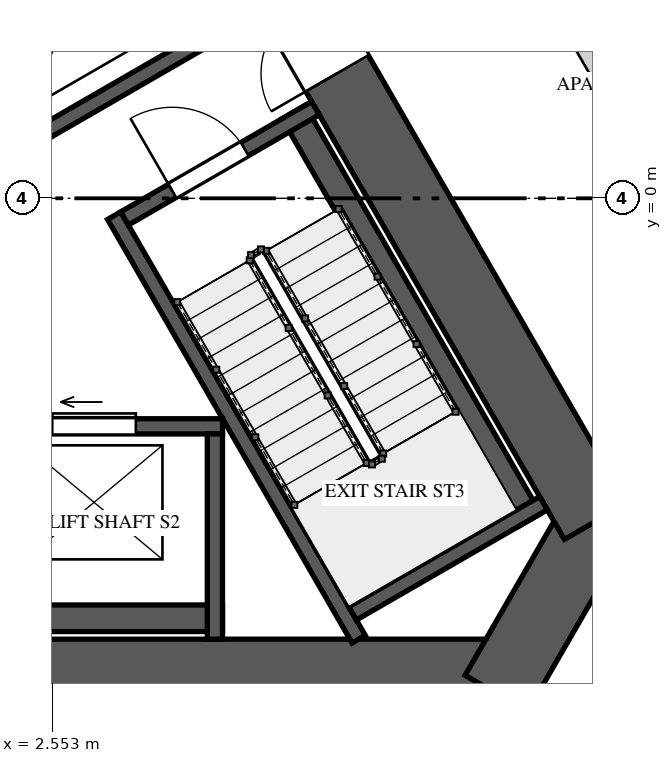
"""IFC4 building model, lengths in metres.
Left out: names, types, materials, properties, quantities, classifications, styles, units other than length and angle.
Written with IfcOpenShell. Run it as: python <this file> out.ifc"""

import sys

from ifc_helpers import new_model, si_unit, direction, frame, frame_2d, origin, place, context, subcontext, project, spatial, rectangle, extrude, element, fill, save


model = new_model("IFC4")
c1 = context("Model", 3, precision=1e-05, world=origin(), true_north=direction((0.0, 1.0)))
c2 = subcontext(c1, "Body", "Model", "MODEL_VIEW")
j1 = project(units=[si_unit("LENGTHUNIT", "METRE"), si_unit("PLANEANGLEUNIT", "RADIAN")], contexts=[c1])
p1 = place(None, origin())
s1 = spatial("IfcSite", under=j1, at=p1, CompositionType="ELEMENT")
p2 = place(p1, origin())
s2 = spatial("IfcBuilding", under=s1, at=p2, CompositionType="ELEMENT")
p3 = place(p2, frame((0.0, 0.0, 88.4)))
s3 = spatial("IfcBuildingStorey", under=s2, at=p3, CompositionType="ELEMENT", Elevation=88.4)
p4 = place(p3, frame((-8.531, -6.275, 0.0), z_axis=(0.0, 0.0, 1.0), x_axis=(1.0, 0.0, 0.0)))
e1 = element("IfcWall", 1, at=p4, inside=s3, PredefinedType="SHEAR", context=c2, shape_type="SweptSolid", body=[
    extrude(rectangle(XDim=17.061, YDim=0.95, at=frame_2d((8.531, 0.0))), origin(), (0.0, 0.0, 1.0), 4.0),
])
p5 = place(p4, frame((6.735, 0.0, 0.0)))
e2 = element("IfcOpeningElement", 2, at=p5, cuts=e1, PredefinedType="OPENING", context=c2, shape_type="SweptSolid", body=[
    extrude(rectangle(XDim=1.0, YDim=2.4, at=frame_2d((0.5, 1.2))), frame((0.0, 0.485, 0.0), z_axis=(0.0, -1.0, 0.0), x_axis=(1.0, 0.0, 0.0)), (0.0, 0.0, 1.0), 0.97),
])
p6 = place(p3, frame((8.393, -6.512, 0.0), z_axis=(0.0, 0.0, 1.0), x_axis=(0.499995765644, 0.866027848477, 0.0)))
e3 = element("IfcWall", 3, at=p6, inside=s3, PredefinedType="SHEAR", context=c2, shape_type="SweptSolid", body=[
    extrude(rectangle(XDim=2.887, YDim=0.95, at=frame_2d((1.443, 0.0))), origin(), (0.0, 0.0, 1.0), 4.0),
])
p7 = place(p3, frame((9.699, -4.25, 0.0), z_axis=(0.0, 0.0, 1.0), x_axis=(-0.499999102847, 0.866025921755, 0.0)))
e4 = element("IfcWall", 4, at=p7, inside=s3, PredefinedType="SHEAR", context=c2, shape_type="SweptSolid", body=[
    extrude(rectangle(XDim=17.061, YDim=0.95, at=frame_2d((8.53, 0.0))), origin(), (0.0, 0.0, 1.0), 4.0),
])
p8 = place(p7, frame((6.805, 0.0, 0.0)))
e5 = element("IfcOpeningElement", 5, at=p8, cuts=e4, PredefinedType="OPENING", context=c2, shape_type="SweptSolid", body=[
    extrude(rectangle(XDim=1.0, YDim=2.4, at=frame_2d((0.5, 1.2))), frame((0.0, 0.485, 0.0), z_axis=(0.0, -1.0, 0.0), x_axis=(1.0, 0.0, 0.0)), (0.0, 0.0, 1.0), 0.97),
])
p9 = place(p3, frame((8.825, -4.235, 0.0), z_axis=(0.0, 0.0, 1.0), x_axis=(-0.499997426962, 0.866026889324, 0.0)))
e6 = element("IfcWall", 6, at=p9, inside=s3, PredefinedType="SOLIDWALL", context=c2, shape_type="SweptSolid", body=[
    extrude(rectangle(XDim=6.2, YDim=0.35, at=frame_2d((3.1, 0.0))), origin(), (0.0, 0.0, 1.0), 3.65),
])
p10 = place(p3, frame((6.582, -5.8, 0.0), z_axis=(0.0, 0.0, 1.0), x_axis=(-0.499975376872, 0.866039619487, 0.0)))
e7 = element("IfcWall", 7, at=p10, inside=s3, PredefinedType="SOLIDWALL", context=c2, shape_type="SweptSolid", body=[
    extrude(rectangle(XDim=6.434, YDim=0.2, at=frame_2d((3.217, 0.0))), origin(), (0.0, 0.0, 1.0), 3.65),
])
p11 = place(p3, frame((6.501, -5.461, 0.0), z_axis=(0.0, 0.0, 1.0), x_axis=(0.866032775405, 0.499987231761, 0.0)))
e8 = element("IfcWall", 8, at=p11, inside=s3, PredefinedType="SOLIDWALL", context=c2, shape_type="SweptSolid", body=[
    extrude(rectangle(XDim=2.9, YDim=0.2, at=frame_2d((1.45, 0.0))), origin(), (0.0, 0.0, 1.0), 3.65),
])
p12 = place(p3, frame((3.501, -0.265, 0.0), z_axis=(0.0, 0.0, 1.0), x_axis=(0.866032775405, 0.499987231761, 0.0)))
e9 = element("IfcWall", 9, at=p12, inside=s3, PredefinedType="SOLIDWALL", context=c2, shape_type="SweptSolid", body=[
    extrude(rectangle(XDim=2.9, YDim=0.2, at=frame_2d((1.45, 0.0))), origin(), (0.0, 0.0, 1.0), 3.65),
])
p13 = place(p12, frame((0.725, 0.0, 0.0)))
e10 = element("IfcOpeningElement", 10, at=p13, cuts=e9, PredefinedType="OPENING", context=c2, shape_type="SweptSolid", body=[
    extrude(rectangle(XDim=1.1, YDim=2.4, at=frame_2d((0.55, 1.2))), frame((0.0, 0.11, 0.0), z_axis=(0.0, -1.0, 0.0), x_axis=(1.0, 0.0, 0.0)), (0.0, 0.0, 1.0), 0.22),
])
p14 = place(p3, frame((-0.71, -3.0, 0.0), z_axis=(0.0, 0.0, 1.0), x_axis=(1.0, 0.0, 0.0)))
e11 = element("IfcWall", 11, at=p14, inside=s3, PredefinedType="SOLIDWALL", context=c2, shape_type="SweptSolid", body=[
    extrude(rectangle(XDim=5.5, YDim=0.2, at=frame_2d((2.75, 0.0))), origin(), (0.0, 0.0, 1.0), 3.65),
])
p15 = place(p14, frame((0.61, 0.0, 0.0)))
e12 = element("IfcOpeningElement", 12, at=p15, cuts=e11, PredefinedType="OPENING", context=c2, shape_type="SweptSolid", body=[
    extrude(rectangle(XDim=1.1, YDim=2.1, at=frame_2d((0.55, 1.05))), frame((0.0, 0.11, 0.0), z_axis=(0.0, -1.0, 0.0), x_axis=(1.0, 0.0, 0.0)), (0.0, 0.0, 1.0), 0.22),
])
p16 = place(p14, frame((3.26, 0.0, 0.0)))
e13 = element("IfcOpeningElement", 13, at=p16, cuts=e11, PredefinedType="OPENING", context=c2, shape_type="SweptSolid", body=[
    extrude(rectangle(XDim=1.1, YDim=2.1, at=frame_2d((0.55, 1.05))), frame((0.0, 0.11, 0.0), z_axis=(0.0, -1.0, 0.0), x_axis=(1.0, 0.0, 0.0)), (0.0, 0.0, 1.0), 0.22),
])
p17 = place(p3, frame((-0.71, -5.525, 0.0), z_axis=(0.0, 0.0, 1.0), x_axis=(1.0, 0.0, 0.0)))
e14 = element("IfcWall", 14, at=p17, inside=s3, PredefinedType="SOLIDWALL", context=c2, shape_type="SweptSolid", body=[
    extrude(rectangle(XDim=5.5, YDim=0.35, at=frame_2d((2.75, 0.0))), origin(), (0.0, 0.0, 1.0), 3.65),
])
p18 = place(p3, frame((4.69, -3.1, 0.0), z_axis=(0.0, 0.0, 1.0), x_axis=(0.0, -1.0, 0.0)))
e15 = element("IfcWall", 15, at=p18, inside=s3, PredefinedType="SOLIDWALL", context=c2, shape_type="SweptSolid", body=[
    extrude(rectangle(XDim=2.7, YDim=0.2, at=frame_2d((1.35, 0.0))), origin(), (0.0, 0.0, 1.0), 3.65),
])
p19 = place(p3, frame((2.227, 0.743, 0.0), z_axis=(0.0, 0.0, 1.0), x_axis=(0.866036909293, 0.499980071345, 0.0)))
e16 = element("IfcWall", 16, at=p19, inside=s3, PredefinedType="SOLIDWALL", context=c2, shape_type="SweptSolid", body=[
    extrude(rectangle(XDim=3.5, YDim=0.2, at=frame_2d((1.75, 0.0))), origin(), (0.0, 0.0, 1.0), 3.65),
])
p20 = place(p3, frame((8.885, 3.111, 0.0), z_axis=(0.0, 0.0, 1.0), x_axis=(0.500035462246, -0.866004928679, 0.0)))
e17 = element("IfcWall", 17, at=p20, inside=s3, PredefinedType="SOLIDWALL", context=c2, shape_type="SweptSolid", body=[
    extrude(rectangle(XDim=2.385, YDim=0.2, at=frame_2d((1.193, 0.0))), origin(), (0.0, 0.0, 1.0), 3.65),
])
p21 = place(p13, origin())
e18 = element("IfcDoor", 18, at=p21, inside=s3, OperationType="SINGLE_SWING_RIGHT", PredefinedType="DOOR", context=c2, shape_type="SweptSolid", body=[
    extrude(rectangle(XDim=1.1, YDim=2.4, at=frame_2d((0.55, 1.2))), frame((0.0, 0.025, 0.0), z_axis=(0.0, -1.0, 0.0), x_axis=(1.0, 0.0, 0.0)), (0.0, 0.0, 1.0), 0.05),
])
fill(e10, e18)
p22 = place(p16, origin())
e19 = element("IfcDoor", 19, at=p22, inside=s3, OperationType="SLIDING_TO_LEFT", PredefinedType="DOOR", context=c2, shape_type="SweptSolid", body=[
    extrude(rectangle(XDim=1.1, YDim=2.1, at=frame_2d((0.55, 1.05))), frame((0.0, 0.025, 0.0), z_axis=(0.0, -1.0, 0.0), x_axis=(1.0, 0.0, 0.0)), (0.0, 0.0, 1.0), 0.05),
])
fill(e13, e19)
p23 = place(p8, origin())
e20 = element("IfcDoor", 20, at=p23, inside=s3, OperationType="SINGLE_SWING_LEFT", PredefinedType="DOOR", context=c2, shape_type="SweptSolid", body=[
    extrude(rectangle(XDim=1.0, YDim=2.4, at=frame_2d((0.5, 1.2))), frame((0.0, 0.025, 0.0), z_axis=(0.0, -1.0, 0.0), x_axis=(1.0, 0.0, 0.0)), (0.0, 0.0, 1.0), 0.05),
])
fill(e5, e20)
save(model, sys.argv[1])
